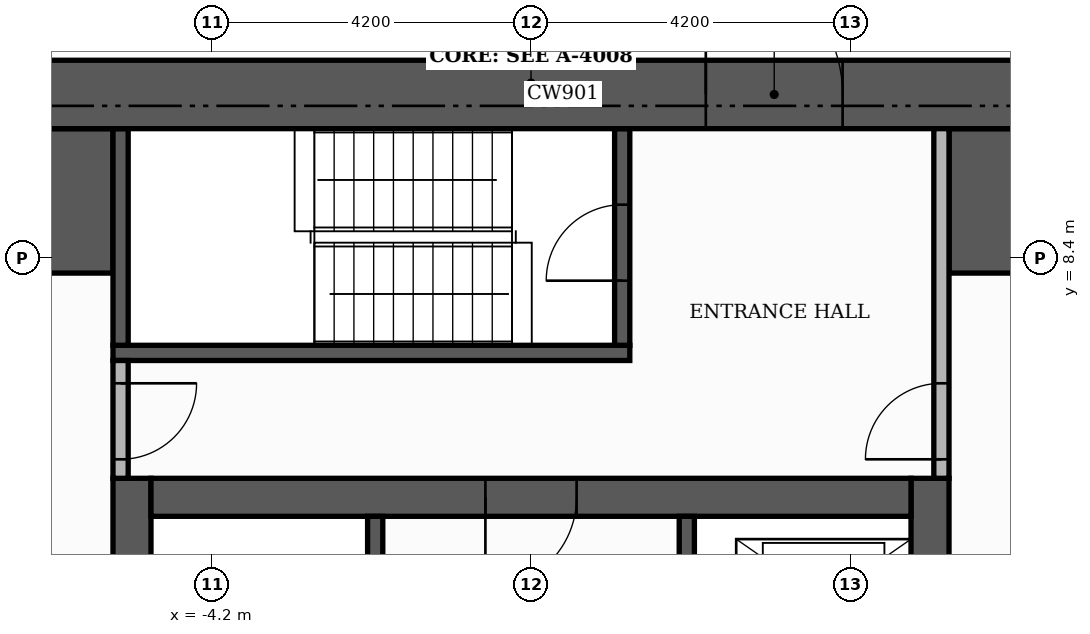
"""IFC4 building model, lengths in metres.
Left out: names, types, materials, properties, quantities, classifications, styles, units other than length and angle.
Written with IfcOpenShell. Run it as: python <this file> out.ifc"""

import sys

from ifc_helpers import new_model, si_unit, direction, frame, frame_2d, origin, place, context, subcontext, project, spatial, rectangle, extrude, element, fill, save


model = new_model("IFC4")
c1 = context("Model", 3, precision=1e-05, world=origin(), true_north=direction((0.0, 1.0)))
c2 = subcontext(c1, "Body", "Model", "MODEL_VIEW")
j1 = project(units=[si_unit("LENGTHUNIT", "METRE"), si_unit("PLANEANGLEUNIT", "RADIAN")], contexts=[c1])
p1 = place(None, origin())
s1 = spatial("IfcSite", under=j1, at=p1, CompositionType="ELEMENT")
p2 = place(p1, origin())
s2 = spatial("IfcBuilding", under=s1, at=p2, CompositionType="ELEMENT")
p3 = place(p2, frame((0.0, 0.0, 34.8)))
s3 = spatial("IfcBuildingStorey", under=s2, at=p3, CompositionType="ELEMENT", Elevation=34.8)
for number, where, z_axis, x_axis in (
    (1, (-5.25, -5.0, 0.0), (0.0, 0.0, 1.0), (0.0, 1.0, 0.0)),
    (2, (5.25, -5.0, 0.0), (0.0, 0.0, 1.0), (0.0, 1.0, 0.0)),
):
    element("IfcWall", number, at=place(p3, frame(where, z_axis=z_axis, x_axis=x_axis)), inside=s3, PredefinedType="SHEAR", context=c2, shape_type="SweptSolid", body=[
        extrude(rectangle(XDim=10.5, YDim=0.5, at=frame_2d((5.25, 0.0))), origin(), (0.0, 0.0, 1.0), 3.48),
    ])
p4 = place(p3, frame((-5.0, 5.25, 0.0), z_axis=(0.0, 0.0, 1.0), x_axis=(1.0, 0.0, 0.0)))
e3 = element("IfcWall", 3, at=p4, inside=s3, PredefinedType="SHEAR", context=c2, shape_type="SweptSolid", body=[
    extrude(rectangle(XDim=10.0, YDim=0.5, at=frame_2d((5.0, 0.0))), origin(), (0.0, 0.0, 1.0), 3.48),
])
p5 = place(p4, frame((4.4, 0.0, 0.0)))
e4 = element("IfcOpeningElement", 4, at=p5, cuts=e3, PredefinedType="OPENING", context=c2, shape_type="SweptSolid", body=[
    extrude(rectangle(XDim=1.2, YDim=2.1, at=frame_2d((0.6, 1.05))), frame((0.0, 0.26, 0.0), z_axis=(0.0, -1.0, 0.0), x_axis=(1.0, 0.0, 0.0)), (0.0, 0.0, 1.0), 0.52),
])
for number, where, z_axis, x_axis in (
    (5, (-10.1, 9.15, 0.0), (0.0, 0.0, 1.0), (1.0, 0.0, 0.0)),
    (6, (5.5, 9.15, 0.0), (0.0, 0.0, 1.0), (1.0, 0.0, 0.0)),
):
    element("IfcWall", number, at=place(p3, frame(where, z_axis=z_axis, x_axis=x_axis)), inside=s3, PredefinedType="SHEAR", context=c2, shape_type="SweptSolid", body=[
        extrude(rectangle(XDim=4.6, YDim=1.9, at=frame_2d((2.3, 0.0))), origin(), (0.0, 0.0, 1.0), 3.48),
    ])
p6 = place(p3, frame((-2.05, -1.4, 0.0), z_axis=(0.0, 0.0, 1.0), x_axis=(0.0, 1.0, 0.0)))
e7 = element("IfcWall", 7, at=p6, inside=s3, PredefinedType="SHEAR", context=c2, shape_type="SweptSolid", body=[
    extrude(rectangle(XDim=6.4, YDim=0.2, at=frame_2d((3.2, 0.0))), origin(), (0.0, 0.0, 1.0), 3.48),
])
p7 = place(p6, frame((0.15, 0.0, 0.0)))
e8 = element("IfcOpeningElement", 8, at=p7, cuts=e7, PredefinedType="OPENING", context=c2, shape_type="SweptSolid", body=[
    extrude(rectangle(XDim=1.0, YDim=2.1, at=frame_2d((0.5, 1.05))), frame((0.0, 0.11, 0.0), z_axis=(0.0, -1.0, 0.0), x_axis=(1.0, 0.0, 0.0)), (0.0, 0.0, 1.0), 0.22),
])
p8 = place(p3, frame((-5.5, 7.15, 0.0), z_axis=(0.0, 0.0, 1.0), x_axis=(1.0, 0.0, 0.0)))
e9 = element("IfcWall", 9, at=p8, inside=s3, PredefinedType="SHEAR", context=c2, shape_type="SweptSolid", body=[
    extrude(rectangle(XDim=6.8, YDim=0.2, at=frame_2d((3.4, 0.0))), origin(), (0.0, 0.0, 1.0), 3.48),
])
p9 = place(p3, frame((-5.4, 7.25, 0.0), z_axis=(0.0, 0.0, 1.0), x_axis=(0.0, 1.0, 0.0)))
e10 = element("IfcWall", 10, at=p9, inside=s3, PredefinedType="SHEAR", context=c2, shape_type="SweptSolid", body=[
    extrude(rectangle(XDim=2.85, YDim=0.2, at=frame_2d((1.425, 0.0))), origin(), (0.0, 0.0, 1.0), 3.48),
])
p10 = place(p3, frame((1.2, 7.25, 0.0), z_axis=(0.0, 0.0, 1.0), x_axis=(0.0, 1.0, 0.0)))
e11 = element("IfcWall", 11, at=p10, inside=s3, PredefinedType="SHEAR", context=c2, shape_type="SweptSolid", body=[
    extrude(rectangle(XDim=2.85, YDim=0.2, at=frame_2d((1.425, 0.0))), origin(), (0.0, 0.0, 1.0), 3.48),
])
p11 = place(p10, frame((0.85, 0.0, 0.0)))
e12 = element("IfcOpeningElement", 12, at=p11, cuts=e11, PredefinedType="OPENING", context=c2, shape_type="SweptSolid", body=[
    extrude(rectangle(XDim=1.0, YDim=2.1, at=frame_2d((0.5, 1.05))), frame((0.0, 0.11, 0.0), z_axis=(0.0, -1.0, 0.0), x_axis=(1.0, 0.0, 0.0)), (0.0, 0.0, 1.0), 0.22),
])
p12 = place(p3, frame((2.05, 1.6, 0.0), z_axis=(0.0, 0.0, 1.0), x_axis=(0.0, 1.0, 0.0)))
e13 = element("IfcWall", 13, at=p12, inside=s3, PredefinedType="SHEAR", context=c2, shape_type="SweptSolid", body=[
    extrude(rectangle(XDim=3.4, YDim=0.2, at=frame_2d((1.7, 0.0))), origin(), (0.0, 0.0, 1.0), 3.48),
])
p13 = place(p12, frame((1.75, 0.0, 0.0)))
e14 = element("IfcOpeningElement", 14, at=p13, cuts=e13, PredefinedType="OPENING", context=c2, shape_type="SweptSolid", body=[
    extrude(rectangle(XDim=1.1, YDim=2.1, at=frame_2d((0.55, 1.05))), frame((0.0, 0.11, 0.0), z_axis=(0.0, -1.0, 0.0), x_axis=(1.0, 0.0, 0.0)), (0.0, 0.0, 1.0), 0.22),
])
p14 = place(p12, frame((0.15, 0.0, 0.0)))
e15 = element("IfcOpeningElement", 15, at=p14, cuts=e13, PredefinedType="OPENING", context=c2, shape_type="SweptSolid", body=[
    extrude(rectangle(XDim=0.8, YDim=2.1, at=frame_2d((0.4, 1.05))), frame((0.0, 0.11, 0.0), z_axis=(0.0, -1.0, 0.0), x_axis=(1.0, 0.0, 0.0)), (0.0, 0.0, 1.0), 0.22),
])
p15 = place(p3, frame((-11.0, 10.55, 0.0), z_axis=(0.0, 0.0, 1.0), x_axis=(1.0, 0.0, 0.0)))
e16 = element("IfcWall", 16, at=p15, inside=s3, PredefinedType="SHEAR", context=c2, shape_type="SweptSolid", body=[
    extrude(rectangle(XDim=22.0, YDim=0.9, at=frame_2d((11.0, 0.0))), origin(), (0.0, 0.0, 1.0), 3.48),
])
p16 = place(p15, frame((13.3, 0.0, 0.0)))
e17 = element("IfcOpeningElement", 17, at=p16, cuts=e16, PredefinedType="OPENING", context=c2, shape_type="SweptSolid", body=[
    extrude(rectangle(XDim=1.8, YDim=2.2, at=frame_2d((0.9, 1.1))), frame((0.0, 0.46, 0.0), z_axis=(0.0, -1.0, 0.0), x_axis=(1.0, 0.0, 0.0)), (0.0, 0.0, 1.0), 0.92),
])
p17 = place(p3, frame((-5.4, 5.5, 0.0), z_axis=(0.0, 0.0, 1.0), x_axis=(0.0, 1.0, 0.0)))
e18 = element("IfcWall", 18, at=p17, inside=s3, PredefinedType="PARTITIONING", context=c2, shape_type="SweptSolid", body=[
    extrude(rectangle(XDim=1.55, YDim=0.2, at=frame_2d((0.775, 0.0))), origin(), (0.0, 0.0, 1.0), 3.48),
])
p18 = place(p17, frame((0.25, 0.0, 0.0)))
e19 = element("IfcOpeningElement", 19, at=p18, cuts=e18, PredefinedType="OPENING", context=c2, shape_type="SweptSolid", body=[
    extrude(rectangle(XDim=1.0, YDim=2.1, at=frame_2d((0.5, 1.05))), frame((0.0, 0.11, 0.0), z_axis=(0.0, -1.0, 0.0), x_axis=(1.0, 0.0, 0.0)), (0.0, 0.0, 1.0), 0.22),
])
p19 = place(p3, frame((5.4, 5.5, 0.0), z_axis=(0.0, 0.0, 1.0), x_axis=(0.0, 1.0, 0.0)))
e20 = element("IfcWall", 20, at=p19, inside=s3, PredefinedType="PARTITIONING", context=c2, shape_type="SweptSolid", body=[
    extrude(rectangle(XDim=4.6, YDim=0.2, at=frame_2d((2.3, 0.0))), origin(), (0.0, 0.0, 1.0), 3.48),
])
p20 = place(p19, frame((0.25, 0.0, 0.0)))
e21 = element("IfcOpeningElement", 21, at=p20, cuts=e20, PredefinedType="OPENING", context=c2, shape_type="SweptSolid", body=[
    extrude(rectangle(XDim=1.0, YDim=2.1, at=frame_2d((0.5, 1.05))), frame((0.0, 0.11, 0.0), z_axis=(0.0, -1.0, 0.0), x_axis=(1.0, 0.0, 0.0)), (0.0, 0.0, 1.0), 0.22),
])
p21 = place(p5, frame((1.2, 0.0, 0.0), z_axis=(0.0, 0.0, 1.0), x_axis=(-1.0, 0.0, 0.0)))
e22 = element("IfcDoor", 22, at=p21, inside=s3, OperationType="SINGLE_SWING_LEFT", PredefinedType="DOOR", context=c2, shape_type="SweptSolid", body=[
    extrude(rectangle(XDim=1.2, YDim=2.1, at=frame_2d((0.6, 1.05))), frame((0.0, 0.025, 0.0), z_axis=(0.0, -1.0, 0.0), x_axis=(1.0, 0.0, 0.0)), (0.0, 0.0, 1.0), 0.05),
])
fill(e4, e22)
p22 = place(p11, origin())
e23 = element("IfcDoor", 23, at=p22, inside=s3, OperationType="SINGLE_SWING_LEFT", PredefinedType="DOOR", context=c2, shape_type="SweptSolid", body=[
    extrude(rectangle(XDim=1.0, YDim=2.1, at=frame_2d((0.5, 1.05))), frame((0.0, 0.025, 0.0), z_axis=(0.0, -1.0, 0.0), x_axis=(1.0, 0.0, 0.0)), (0.0, 0.0, 1.0), 0.05),
])
fill(e12, e23)
p23 = place(p18, frame((1.0, 0.0, 0.0), z_axis=(0.0, 0.0, 1.0), x_axis=(-1.0, 0.0, 0.0)))
e24 = element("IfcDoor", 24, at=p23, inside=s3, OperationType="SINGLE_SWING_RIGHT", PredefinedType="DOOR", context=c2, shape_type="SweptSolid", body=[
    extrude(rectangle(XDim=1.0, YDim=2.1, at=frame_2d((0.5, 1.05))), frame((0.0, 0.025, 0.0), z_axis=(0.0, -1.0, 0.0), x_axis=(1.0, 0.0, 0.0)), (0.0, 0.0, 1.0), 0.05),
])
fill(e19, e24)
p24 = place(p20, origin())
e25 = element("IfcDoor", 25, at=p24, inside=s3, OperationType="SINGLE_SWING_LEFT", PredefinedType="DOOR", context=c2, shape_type="SweptSolid", body=[
    extrude(rectangle(XDim=1.0, YDim=2.1, at=frame_2d((0.5, 1.05))), frame((0.0, 0.025, 0.0), z_axis=(0.0, -1.0, 0.0), x_axis=(1.0, 0.0, 0.0)), (0.0, 0.0, 1.0), 0.05),
])
fill(e21, e25)
p25 = place(p16, origin())
e26 = element("IfcDoor", 26, at=p25, inside=s3, OperationType="DOUBLE_DOOR_SINGLE_SWING", PredefinedType="DOOR", context=c2, shape_type="SweptSolid", body=[
    extrude(rectangle(XDim=1.8, YDim=2.2, at=frame_2d((0.9, 1.1))), frame((0.0, 0.025, 0.0), z_axis=(0.0, -1.0, 0.0), x_axis=(1.0, 0.0, 0.0)), (0.0, 0.0, 1.0), 0.05),
])
fill(e17, e26)
save(model, sys.argv[1])
